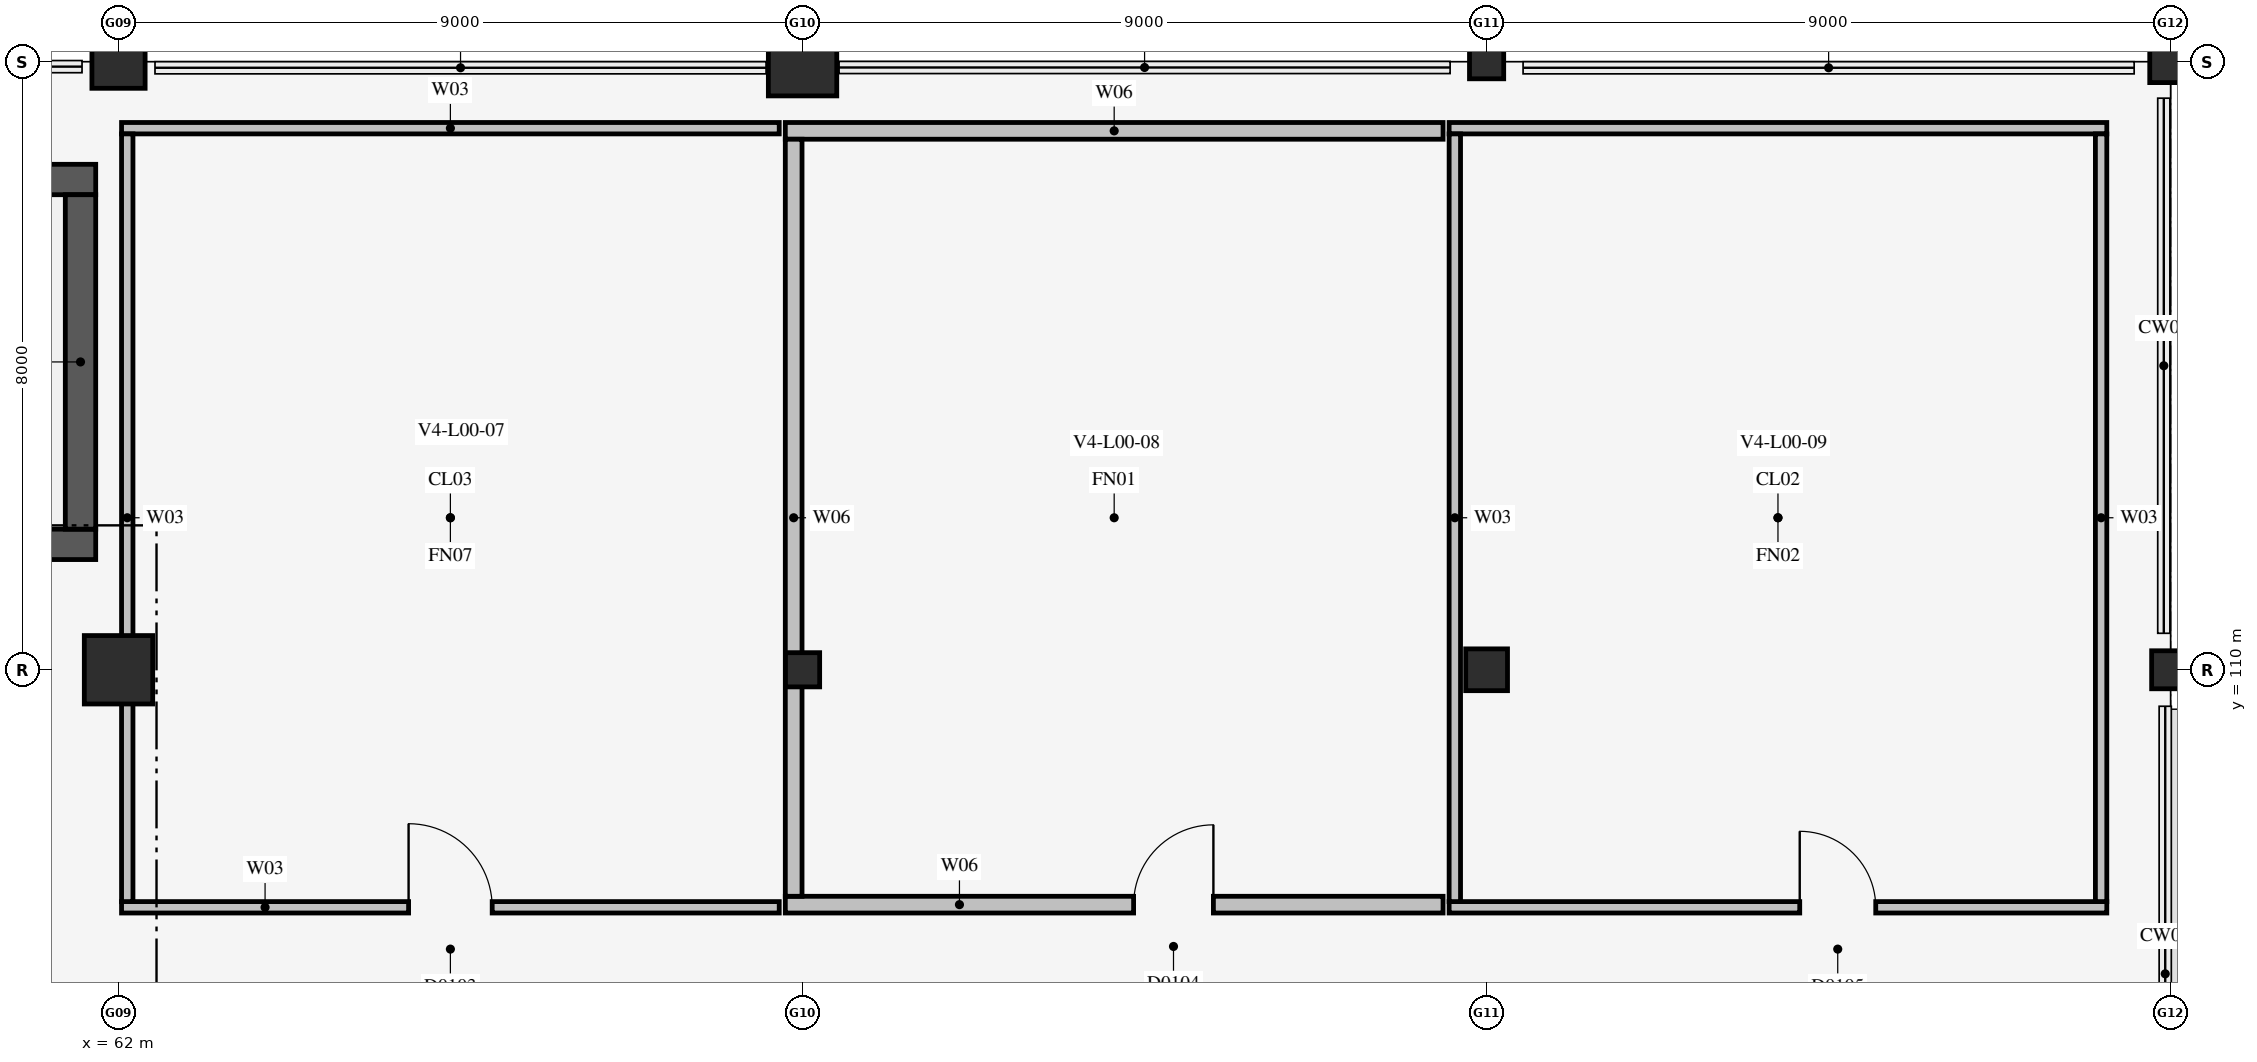
"""IFC4 building model, lengths in metres.
Left out: names, types, materials, properties, quantities, classifications, styles, units other than length and angle.
Written with IfcOpenShell. Run it as: python <this file> out.ifc"""

import sys

from ifc_helpers import new_model, si_unit, direction, frame, frame_2d, origin, origin_2d, place, context, subcontext, project, spatial, rectangle, circle, extrude, element, fill, save


model = new_model("IFC4")
c1 = context("Model", 3, precision=1e-05, world=origin(), true_north=direction((0.0, 1.0)))
c2 = subcontext(c1, "Body", "Model", "MODEL_VIEW")
j1 = project(units=[si_unit("LENGTHUNIT", "METRE"), si_unit("PLANEANGLEUNIT", "RADIAN")], contexts=[c1])
p1 = place(None, origin())
s1 = spatial("IfcSite", under=j1, at=p1, CompositionType="ELEMENT")
p2 = place(p1, origin())
s2 = spatial("IfcBuilding", under=s1, at=p2, CompositionType="ELEMENT")
p3 = place(p2, origin())
s3 = spatial("IfcBuildingStorey", under=s2, at=p3, CompositionType="ELEMENT", Elevation=0.0)
p4 = place(p3, frame((52.2, 111.65, 0.0), z_axis=(0.0, 0.0, 1.0), x_axis=(1.0, 0.0, 0.0)))
e1 = element("IfcWall", 1, at=p4, inside=s3, PredefinedType="SHEAR", context=c2, shape_type="SweptSolid", body=[
    extrude(rectangle(XDim=9.5, YDim=0.4, at=frame_2d((4.75, 0.0))), origin(), (0.0, 0.0, 1.0), 5.16),
])
p5 = place(p4, frame((0.48, 0.0, 0.0)))
e2 = element("IfcOpeningElement", 2, at=p5, cuts=e1, PredefinedType="OPENING", context=c2, shape_type="SweptSolid", body=[
    extrude(rectangle(XDim=1.6, YDim=2.2, at=frame_2d((0.8, 1.1))), frame((0.0, 0.212, 0.0), z_axis=(0.0, -1.0, 0.0), x_axis=(1.0, 0.0, 0.0)), (0.0, 0.0, 1.0), 0.424),
])
p6 = place(p3, frame((52.2, 116.45, 0.0), z_axis=(0.0, 0.0, 1.0), x_axis=(1.0, 0.0, 0.0)))
e3 = element("IfcWall", 3, at=p6, inside=s3, PredefinedType="SHEAR", context=c2, shape_type="SweptSolid", body=[
    extrude(rectangle(XDim=9.5, YDim=0.4, at=frame_2d((4.75, 0.0))), origin(), (0.0, 0.0, 1.0), 5.16),
])
p7 = place(p3, frame((61.5, 111.85, 0.0), z_axis=(0.0, 0.0, 1.0), x_axis=(0.0, 1.0, 0.0)))
e4 = element("IfcWall", 4, at=p7, inside=s3, PredefinedType="SHEAR", context=c2, shape_type="SweptSolid", body=[
    extrude(rectangle(XDim=4.4, YDim=0.4, at=frame_2d((2.2, 0.0))), origin(), (0.0, 0.0, 1.0), 5.16),
])
p8 = place(p3, frame((62.0, 110.0, 0.0), z_axis=(0.0, 0.0, 1.0), x_axis=(1.0, 0.0, 0.0)))
e5 = element("IfcColumn", 5, at=p8, inside=s3, PredefinedType="COLUMN", context=c2, shape_type="SweptSolid", body=[
    extrude(circle(Radius=0.45, at=origin_2d()), origin(), (0.0, 0.0, 1.0), 5.4),
])
p9 = place(p3, frame((62.0, 118.0, 0.0), z_axis=(0.0, 0.0, 1.0), x_axis=(1.0, 0.0, 0.0)))
e6 = element("IfcColumn", 6, at=p9, inside=s3, PredefinedType="COLUMN", context=c2, shape_type="SweptSolid", body=[
    extrude(circle(Radius=0.35, at=origin_2d()), origin(), (0.0, 0.0, 1.0), 5.4),
])
p10 = place(p3, frame((71.0, 110.0, 0.0), z_axis=(0.0, 0.0, 1.0), x_axis=(1.0, 0.0, 0.0)))
e7 = element("IfcColumn", 7, at=p10, inside=s3, PredefinedType="COLUMN", context=c2, shape_type="SweptSolid", body=[
    extrude(rectangle(XDim=0.45, YDim=0.45, at=origin_2d()), origin(), (0.0, 0.0, 1.0), 5.4),
])
p11 = place(p3, frame((71.0, 118.0, 0.0), z_axis=(0.0, 0.0, 1.0), x_axis=(1.0, 0.0, 0.0)))
e8 = element("IfcColumn", 8, at=p11, inside=s3, PredefinedType="COLUMN", context=c2, shape_type="SweptSolid", body=[
    extrude(circle(Radius=0.45, at=origin_2d()), origin(), (0.0, 0.0, 1.0), 5.4),
])
p12 = place(p3, frame((80.0, 110.0, 0.0), z_axis=(0.0, 0.0, 1.0), x_axis=(1.0, 0.0, 0.0)))
e9 = element("IfcColumn", 9, at=p12, inside=s3, PredefinedType="COLUMN", context=c2, shape_type="SweptSolid", body=[
    extrude(rectangle(XDim=0.55, YDim=0.55, at=origin_2d()), origin(), (0.0, 0.0, 1.0), 5.4),
])
p13 = place(p3, frame((80.0, 118.0, 0.0), z_axis=(0.0, 0.0, 1.0), x_axis=(1.0, 0.0, 0.0)))
e10 = element("IfcColumn", 10, at=p13, inside=s3, PredefinedType="COLUMN", context=c2, shape_type="SweptSolid", body=[
    extrude(rectangle(XDim=0.45, YDim=0.45, at=origin_2d()), origin(), (0.0, 0.0, 1.0), 5.4),
])
p14 = place(p3, frame((89.0, 110.0, 0.0), z_axis=(0.0, 0.0, 1.0), x_axis=(1.0, 0.0, 0.0)))
e11 = element("IfcColumn", 11, at=p14, inside=s3, PredefinedType="COLUMN", context=c2, shape_type="SweptSolid", body=[
    extrude(rectangle(XDim=0.5, YDim=0.5, at=origin_2d()), origin(), (0.0, 0.0, 1.0), 5.4),
])
p15 = place(p3, frame((89.0, 118.0, 0.0), z_axis=(0.0, 0.0, 1.0), x_axis=(1.0, 0.0, 0.0)))
e12 = element("IfcColumn", 12, at=p15, inside=s3, PredefinedType="COLUMN", context=c2, shape_type="SweptSolid", body=[
    extrude(rectangle(XDim=0.55, YDim=0.55, at=origin_2d()), origin(), (0.0, 0.0, 1.0), 5.4),
])
p16 = place(p3, frame((62.04, 106.875, 0.0), z_axis=(0.0, 0.0, 1.0), x_axis=(1.0, 0.0, 0.0)))
e13 = element("IfcWall", 13, at=p16, inside=s3, PredefinedType="PARTITIONING", context=c2, shape_type="SweptSolid", body=[
    extrude(rectangle(XDim=8.653, YDim=0.15, at=frame_2d((4.327, 0.0))), origin(), (0.0, 0.0, 1.0), 5.145),
])
p17 = place(p16, frame((3.777, 0.0, 0.0)))
e14 = element("IfcOpeningElement", 14, at=p17, cuts=e13, PredefinedType="OPENING", context=c2, shape_type="SweptSolid", body=[
    extrude(rectangle(XDim=1.1, YDim=2.25, at=frame_2d((0.55, 1.125))), frame((0.0, 0.087, 0.0), z_axis=(0.0, -1.0, 0.0), x_axis=(1.0, 0.0, 0.0)), (0.0, 0.0, 1.0), 0.174),
])
p18 = place(p3, frame((62.04, 117.125, 0.0), z_axis=(0.0, 0.0, 1.0), x_axis=(1.0, 0.0, 0.0)))
e15 = element("IfcWall", 15, at=p18, inside=s3, PredefinedType="PARTITIONING", context=c2, shape_type="SweptSolid", body=[
    extrude(rectangle(XDim=8.653, YDim=0.15, at=frame_2d((4.327, 0.0))), origin(), (0.0, 0.0, 1.0), 5.145),
])
p19 = place(p3, frame((62.115, 106.95, 0.0), z_axis=(0.0, 0.0, 1.0), x_axis=(0.0, 1.0, 0.0)))
e16 = element("IfcWall", 16, at=p19, inside=s3, PredefinedType="PARTITIONING", context=c2, shape_type="SweptSolid", body=[
    extrude(rectangle(XDim=10.1, YDim=0.15, at=frame_2d((5.05, 0.0))), origin(), (0.0, 0.0, 1.0), 4.211),
])
p20 = place(p3, frame((70.773, 106.91, 0.0), z_axis=(0.0, 0.0, 1.0), x_axis=(1.0, 0.0, 0.0)))
e17 = element("IfcWall", 17, at=p20, inside=s3, PredefinedType="PLUMBINGWALL", context=c2, shape_type="SweptSolid", body=[
    extrude(rectangle(XDim=8.654, YDim=0.22, at=frame_2d((4.327, 0.0))), origin(), (0.0, 0.0, 1.0), 5.145),
])
p21 = place(p20, frame((4.583, 0.0, 0.0)))
e18 = element("IfcOpeningElement", 18, at=p21, cuts=e17, PredefinedType="OPENING", context=c2, shape_type="SweptSolid", body=[
    extrude(rectangle(XDim=1.05, YDim=2.15, at=frame_2d((0.525, 1.075))), frame((0.0, 0.122, 0.0), z_axis=(0.0, -1.0, 0.0), x_axis=(1.0, 0.0, 0.0)), (0.0, 0.0, 1.0), 0.244),
])
p22 = place(p3, frame((70.773, 117.09, 0.0), z_axis=(0.0, 0.0, 1.0), x_axis=(1.0, 0.0, 0.0)))
e19 = element("IfcWall", 19, at=p22, inside=s3, PredefinedType="PLUMBINGWALL", context=c2, shape_type="SweptSolid", body=[
    extrude(rectangle(XDim=8.654, YDim=0.22, at=frame_2d((4.327, 0.0))), origin(), (0.0, 0.0, 1.0), 5.145),
])
p23 = place(p3, frame((70.883, 107.02, 0.0), z_axis=(0.0, 0.0, 1.0), x_axis=(0.0, 1.0, 0.0)))
e20 = element("IfcWall", 20, at=p23, inside=s3, PredefinedType="PLUMBINGWALL", context=c2, shape_type="SweptSolid", body=[
    extrude(rectangle(XDim=9.96, YDim=0.22, at=frame_2d((4.98, 0.0))), origin(), (0.0, 0.0, 1.0), 4.198),
])
p24 = place(p3, frame((79.507, 106.875, 0.0), z_axis=(0.0, 0.0, 1.0), x_axis=(1.0, 0.0, 0.0)))
e21 = element("IfcWall", 21, at=p24, inside=s3, PredefinedType="PARTITIONING", context=c2, shape_type="SweptSolid", body=[
    extrude(rectangle(XDim=8.653, YDim=0.15, at=frame_2d((4.326, 0.0))), origin(), (0.0, 0.0, 1.0), 5.145),
])
p25 = place(p24, frame((4.613, 0.0, 0.0)))
e22 = element("IfcOpeningElement", 22, at=p25, cuts=e21, PredefinedType="OPENING", context=c2, shape_type="SweptSolid", body=[
    extrude(rectangle(XDim=1.0, YDim=2.2, at=frame_2d((0.5, 1.1))), frame((0.0, 0.087, 0.0), z_axis=(0.0, -1.0, 0.0), x_axis=(1.0, 0.0, 0.0)), (0.0, 0.0, 1.0), 0.174),
])
p26 = place(p3, frame((79.507, 117.125, 0.0), z_axis=(0.0, 0.0, 1.0), x_axis=(1.0, 0.0, 0.0)))
e23 = element("IfcWall", 23, at=p26, inside=s3, PredefinedType="PARTITIONING", context=c2, shape_type="SweptSolid", body=[
    extrude(rectangle(XDim=8.653, YDim=0.15, at=frame_2d((4.326, 0.0))), origin(), (0.0, 0.0, 1.0), 5.145),
])
for number, where, z_axis, x_axis in (
    (24, (88.085, 106.95, 0.0), (0.0, 0.0, 1.0), (0.0, 1.0, 0.0)),
    (25, (79.582, 106.95, 0.0), (0.0, 0.0, 1.0), (0.0, 1.0, 0.0)),
):
    element("IfcWall", number, at=place(p3, frame(where, z_axis=z_axis, x_axis=x_axis)), inside=s3, PredefinedType="PARTITIONING", context=c2, shape_type="SweptSolid", body=[
        extrude(rectangle(XDim=10.1, YDim=0.15, at=frame_2d((5.05, 0.0))), origin(), (0.0, 0.0, 1.0), 5.145),
    ])
p27 = place(p17, origin())
e26 = element("IfcDoor", 26, at=p27, inside=s3, OperationType="SINGLE_SWING_LEFT", PredefinedType="DOOR", context=c2, shape_type="SweptSolid", body=[
    extrude(rectangle(XDim=1.1, YDim=2.25, at=frame_2d((0.55, 1.125))), frame((0.0, 0.025, 0.0), z_axis=(0.0, -1.0, 0.0), x_axis=(1.0, 0.0, 0.0)), (0.0, 0.0, 1.0), 0.05),
])
fill(e14, e26)
p28 = place(p21, origin())
e27 = element("IfcDoor", 27, at=p28, inside=s3, OperationType="SINGLE_SWING_RIGHT", PredefinedType="DOOR", context=c2, shape_type="SweptSolid", body=[
    extrude(rectangle(XDim=1.05, YDim=2.15, at=frame_2d((0.525, 1.075))), frame((0.0, 0.025, 0.0), z_axis=(0.0, -1.0, 0.0), x_axis=(1.0, 0.0, 0.0)), (0.0, 0.0, 1.0), 0.05),
])
fill(e18, e27)
p29 = place(p25, origin())
e28 = element("IfcDoor", 28, at=p29, inside=s3, OperationType="SINGLE_SWING_LEFT", PredefinedType="DOOR", context=c2, shape_type="SweptSolid", body=[
    extrude(rectangle(XDim=1.0, YDim=2.2, at=frame_2d((0.5, 1.1))), frame((0.0, 0.025, 0.0), z_axis=(0.0, -1.0, 0.0), x_axis=(1.0, 0.0, 0.0)), (0.0, 0.0, 1.0), 0.05),
])
fill(e22, e28)
save(model, sys.argv[1])
